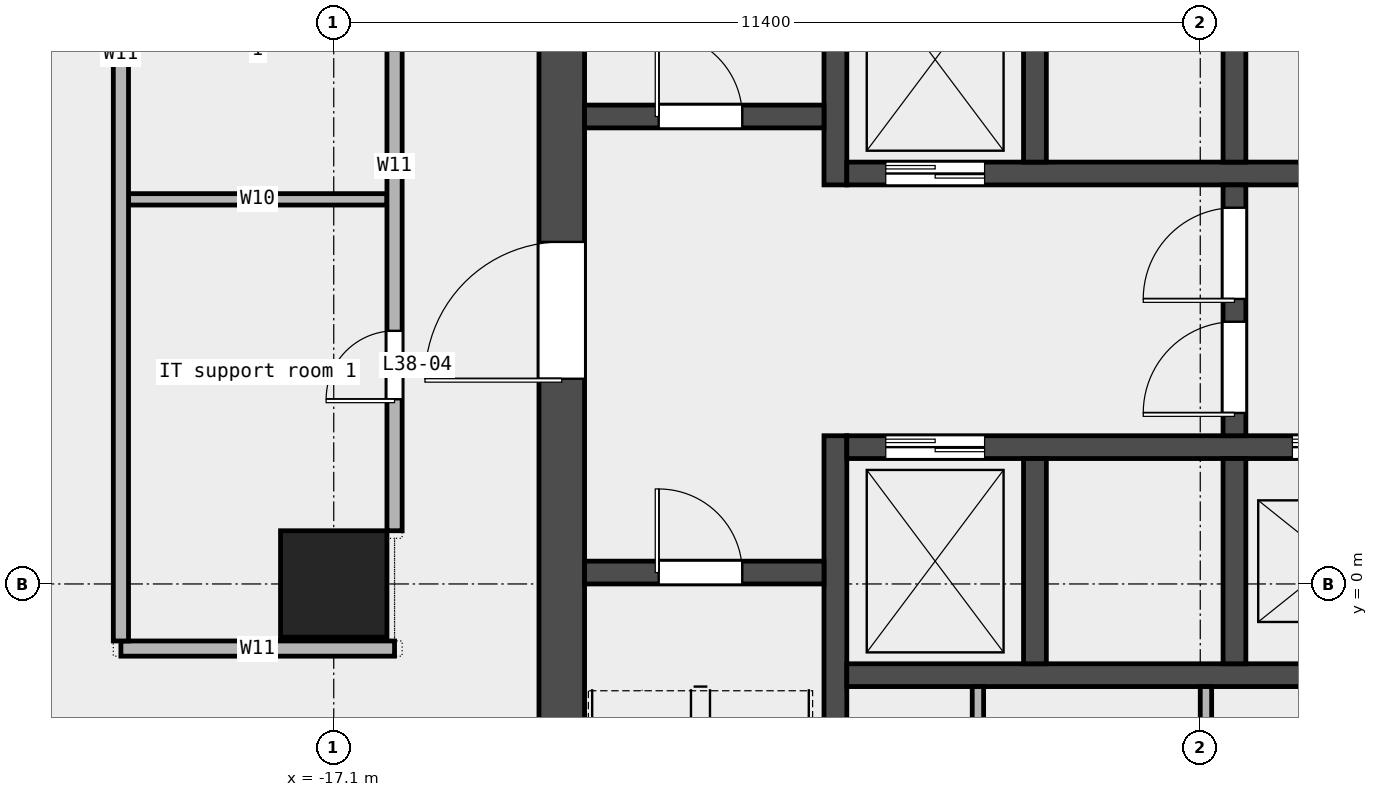
"""IFC4 building model, lengths in metres.
Left out: names, types, materials, properties, quantities, classifications, styles, units other than length and angle.
Written with IfcOpenShell. Run it as: python <this file> out.ifc"""

import sys

from ifc_helpers import new_model, si_unit, direction, frame, frame_2d, origin, origin_2d, place, context, subcontext, project, spatial, rectangle, extrude, element, fill, save


model = new_model("IFC4")
c1 = context("Model", 3, precision=1e-05, world=origin(), true_north=direction((0.0, 1.0)))
c2 = subcontext(c1, "Body", "Model", "MODEL_VIEW")
j1 = project(units=[si_unit("LENGTHUNIT", "METRE"), si_unit("PLANEANGLEUNIT", "RADIAN")], contexts=[c1])
p1 = place(None, origin())
s1 = spatial("IfcSite", under=j1, at=p1, CompositionType="ELEMENT")
p2 = place(p1, origin())
s2 = spatial("IfcBuilding", under=s1, at=p2, CompositionType="ELEMENT")
p3 = place(p2, frame((0.0, 0.0, 185.0)))
s3 = spatial("IfcBuildingStorey", under=s2, at=p3, CompositionType="ELEMENT", Elevation=185.0)
p4 = place(p3, frame((-17.1, 0.0, 0.0), z_axis=(0.0, 0.0, 1.0), x_axis=(1.0, 0.0, 0.0)))
e1 = element("IfcColumn", 1, at=p4, inside=s3, PredefinedType="COLUMN", context=c2, shape_type="SweptSolid", body=[
    extrude(rectangle(XDim=1.4, YDim=1.4, at=origin_2d()), origin(), (0.0, 0.0, 1.0), 3.6),
])
p5 = place(p3, frame((-19.9, -0.85, 0.0), z_axis=(0.0, 0.0, 1.0), x_axis=(1.0, 0.0, 0.0)))
e2 = element("IfcWall", 2, at=p5, inside=s3, PredefinedType="PARTITIONING", context=c2, shape_type="SweptSolid", body=[
    extrude(rectangle(XDim=3.6, YDim=0.2, at=frame_2d((1.8, 0.0))), origin(), (0.0, 0.0, 1.0), 3.6),
])
p6 = place(p3, frame((-19.8, 5.06, 0.0), z_axis=(0.0, 0.0, 1.0), x_axis=(1.0, 0.0, 0.0)))
e3 = element("IfcWall", 3, at=p6, inside=s3, PredefinedType="PARTITIONING", context=c2, shape_type="SweptSolid", body=[
    extrude(rectangle(XDim=3.4, YDim=0.15, at=frame_2d((1.7, 0.0))), origin(), (0.0, 0.0, 1.0), 3.6),
])
p7 = place(p3, frame((-19.9, -0.75, 0.0), z_axis=(0.0, 0.0, 1.0), x_axis=(0.0, 1.0, 0.0)))
e4 = element("IfcWall", 4, at=p7, inside=s3, PredefinedType="PARTITIONING", context=c2, shape_type="SweptSolid", body=[
    extrude(rectangle(XDim=16.05, YDim=0.2, at=frame_2d((8.025, 0.0))), origin(), (0.0, 0.0, 1.0), 3.6),
])
p8 = place(p3, frame((-16.3, 0.7, 0.0), z_axis=(0.0, 0.0, 1.0), x_axis=(0.0, 1.0, 0.0)))
e5 = element("IfcWall", 5, at=p8, inside=s3, PredefinedType="PARTITIONING", context=c2, shape_type="SweptSolid", body=[
    extrude(rectangle(XDim=9.6, YDim=0.2, at=frame_2d((4.8, 0.0))), origin(), (0.0, 0.0, 1.0), 3.6),
])
p9 = place(p8, frame((1.73, 0.0, 0.0)))
e6 = element("IfcOpeningElement", 6, at=p9, cuts=e5, PredefinedType="OPENING", context=c2, shape_type="SweptSolid", body=[
    extrude(rectangle(XDim=0.9, YDim=2.1, at=frame_2d((0.45, 1.05))), frame((0.0, 0.112, 0.0), z_axis=(0.0, -1.0, 0.0), x_axis=(1.0, 0.0, 0.0)), (0.0, 0.0, 1.0), 0.224),
])
p10 = place(p8, frame((6.353, 0.0, 0.0)))
e7 = element("IfcOpeningElement", 7, at=p10, cuts=e5, PredefinedType="OPENING", context=c2, shape_type="SweptSolid", body=[
    extrude(rectangle(XDim=0.9, YDim=2.1, at=frame_2d((0.45, 1.05))), frame((0.0, 0.112, 0.0), z_axis=(0.0, -1.0, 0.0), x_axis=(1.0, 0.0, 0.0)), (0.0, 0.0, 1.0), 0.224),
])
p11 = place(p3, frame((-14.1, -6.6, 0.0), z_axis=(0.0, 0.0, 1.0), x_axis=(0.0, 1.0, 0.0)))
e8 = element("IfcWall", 8, at=p11, inside=s3, PredefinedType="SHEAR", context=c2, shape_type="SweptSolid", body=[
    extrude(rectangle(XDim=19.5, YDim=0.6, at=frame_2d((9.75, 0.0))), origin(), (0.0, 0.0, 1.0), 3.7),
])
p12 = place(p11, frame((9.3, 0.0, 0.0)))
e9 = element("IfcOpeningElement", 9, at=p12, cuts=e8, PredefinedType="OPENING", context=c2, shape_type="SweptSolid", body=[
    extrude(rectangle(XDim=1.8, YDim=2.1, at=frame_2d((0.9, 1.05))), frame((0.0, 0.312, 0.0), z_axis=(0.0, -1.0, 0.0), x_axis=(1.0, 0.0, 0.0)), (0.0, 0.0, 1.0), 0.624),
])
p13 = place(p3, frame((-10.5, -6.6, 0.0), z_axis=(0.0, 0.0, 1.0), x_axis=(0.0, 1.0, 0.0)))
e10 = element("IfcWall", 10, at=p13, inside=s3, PredefinedType="SHEAR", context=c2, shape_type="SweptSolid", body=[
    extrude(rectangle(XDim=8.55, YDim=0.3, at=frame_2d((4.275, 0.0))), origin(), (0.0, 0.0, 1.0), 3.7),
])
p14 = place(p3, frame((-10.5, 5.25, 0.0), z_axis=(0.0, 0.0, 1.0), x_axis=(0.0, 1.0, 0.0)))
e11 = element("IfcWall", 11, at=p14, inside=s3, PredefinedType="SHEAR", context=c2, shape_type="SweptSolid", body=[
    extrude(rectangle(XDim=7.65, YDim=0.3, at=frame_2d((3.825, 0.0))), origin(), (0.0, 0.0, 1.0), 3.7),
])
p15 = place(p3, frame((-13.8, 0.15, 0.0), z_axis=(0.0, 0.0, 1.0), x_axis=(1.0, 0.0, 0.0)))
e12 = element("IfcWall", 12, at=p15, inside=s3, PredefinedType="SOLIDWALL", context=c2, shape_type="SweptSolid", body=[
    extrude(rectangle(XDim=3.15, YDim=0.3, at=frame_2d((1.575, 0.0))), origin(), (0.0, 0.0, 1.0), 3.7),
])
p16 = place(p15, frame((0.975, 0.0, 0.0)))
e13 = element("IfcOpeningElement", 13, at=p16, cuts=e12, PredefinedType="OPENING", context=c2, shape_type="SweptSolid", body=[
    extrude(rectangle(XDim=1.1, YDim=2.1, at=frame_2d((0.55, 1.05))), frame((0.0, 0.162, 0.0), z_axis=(0.0, -1.0, 0.0), x_axis=(1.0, 0.0, 0.0)), (0.0, 0.0, 1.0), 0.324),
])
p17 = place(p3, frame((-13.8, 6.15, 0.0), z_axis=(0.0, 0.0, 1.0), x_axis=(1.0, 0.0, 0.0)))
e14 = element("IfcWall", 14, at=p17, inside=s3, PredefinedType="SOLIDWALL", context=c2, shape_type="SweptSolid", body=[
    extrude(rectangle(XDim=3.15, YDim=0.3, at=frame_2d((1.575, 0.0))), origin(), (0.0, 0.0, 1.0), 3.7),
])
p18 = place(p17, frame((0.975, 0.0, 0.0)))
e15 = element("IfcOpeningElement", 15, at=p18, cuts=e14, PredefinedType="OPENING", context=c2, shape_type="SweptSolid", body=[
    extrude(rectangle(XDim=1.1, YDim=2.1, at=frame_2d((0.55, 1.05))), frame((0.0, 0.162, 0.0), z_axis=(0.0, -1.0, 0.0), x_axis=(1.0, 0.0, 0.0)), (0.0, 0.0, 1.0), 0.324),
])
p19 = place(p3, frame((-10.35, -1.2, 0.0), z_axis=(0.0, 0.0, 1.0), x_axis=(1.0, 0.0, 0.0)))
e16 = element("IfcWall", 16, at=p19, inside=s3, PredefinedType="SOLIDWALL", context=c2, shape_type="SweptSolid", body=[
    extrude(rectangle(XDim=20.7, YDim=0.3, at=frame_2d((10.35, 0.0))), origin(), (0.0, 0.0, 1.0), 3.7),
])
p20 = place(p3, frame((-10.35, 1.8, 0.0), z_axis=(0.0, 0.0, 1.0), x_axis=(1.0, 0.0, 0.0)))
e17 = element("IfcWall", 17, at=p20, inside=s3, PredefinedType="SOLIDWALL", context=c2, shape_type="SweptSolid", body=[
    extrude(rectangle(XDim=20.7, YDim=0.3, at=frame_2d((10.35, 0.0))), origin(), (0.0, 0.0, 1.0), 3.7),
])
p21 = place(p20, frame((0.512, 0.0, 0.0)))
e18 = element("IfcOpeningElement", 18, at=p21, cuts=e17, PredefinedType="OPENING", context=c2, shape_type="SweptSolid", body=[
    extrude(rectangle(XDim=1.3, YDim=2.1, at=frame_2d((0.65, 1.05))), frame((0.0, 0.162, 0.0), z_axis=(0.0, -1.0, 0.0), x_axis=(1.0, 0.0, 0.0)), (0.0, 0.0, 1.0), 0.324),
])
p22 = place(p20, frame((5.863, 0.0, 0.0)))
e19 = element("IfcOpeningElement", 19, at=p22, cuts=e17, PredefinedType="OPENING", context=c2, shape_type="SweptSolid", body=[
    extrude(rectangle(XDim=1.1, YDim=2.1, at=frame_2d((0.55, 1.05))), frame((0.0, 0.162, 0.0), z_axis=(0.0, -1.0, 0.0), x_axis=(1.0, 0.0, 0.0)), (0.0, 0.0, 1.0), 0.324),
])
p23 = place(p20, frame((8.488, 0.0, 0.0)))
e20 = element("IfcOpeningElement", 20, at=p23, cuts=e17, PredefinedType="OPENING", context=c2, shape_type="SweptSolid", body=[
    extrude(rectangle(XDim=1.1, YDim=2.1, at=frame_2d((0.55, 1.05))), frame((0.0, 0.162, 0.0), z_axis=(0.0, -1.0, 0.0), x_axis=(1.0, 0.0, 0.0)), (0.0, 0.0, 1.0), 0.324),
])
p24 = place(p20, frame((11.113, 0.0, 0.0)))
e21 = element("IfcOpeningElement", 21, at=p24, cuts=e17, PredefinedType="OPENING", context=c2, shape_type="SweptSolid", body=[
    extrude(rectangle(XDim=1.1, YDim=2.1, at=frame_2d((0.55, 1.05))), frame((0.0, 0.162, 0.0), z_axis=(0.0, -1.0, 0.0), x_axis=(1.0, 0.0, 0.0)), (0.0, 0.0, 1.0), 0.324),
])
p25 = place(p20, frame((13.738, 0.0, 0.0)))
e22 = element("IfcOpeningElement", 22, at=p25, cuts=e17, PredefinedType="OPENING", context=c2, shape_type="SweptSolid", body=[
    extrude(rectangle(XDim=1.1, YDim=2.1, at=frame_2d((0.55, 1.05))), frame((0.0, 0.162, 0.0), z_axis=(0.0, -1.0, 0.0), x_axis=(1.0, 0.0, 0.0)), (0.0, 0.0, 1.0), 0.324),
])
p26 = place(p20, frame((16.363, 0.0, 0.0)))
e23 = element("IfcOpeningElement", 23, at=p26, cuts=e17, PredefinedType="OPENING", context=c2, shape_type="SweptSolid", body=[
    extrude(rectangle(XDim=1.1, YDim=2.1, at=frame_2d((0.55, 1.05))), frame((0.0, 0.162, 0.0), z_axis=(0.0, -1.0, 0.0), x_axis=(1.0, 0.0, 0.0)), (0.0, 0.0, 1.0), 0.324),
])
p27 = place(p20, frame((18.988, 0.0, 0.0)))
e24 = element("IfcOpeningElement", 24, at=p27, cuts=e17, PredefinedType="OPENING", context=c2, shape_type="SweptSolid", body=[
    extrude(rectangle(XDim=1.1, YDim=2.1, at=frame_2d((0.55, 1.05))), frame((0.0, 0.162, 0.0), z_axis=(0.0, -1.0, 0.0), x_axis=(1.0, 0.0, 0.0)), (0.0, 0.0, 1.0), 0.324),
])
p28 = place(p3, frame((-10.35, 5.4, 0.0), z_axis=(0.0, 0.0, 1.0), x_axis=(1.0, 0.0, 0.0)))
e25 = element("IfcWall", 25, at=p28, inside=s3, PredefinedType="SOLIDWALL", context=c2, shape_type="SweptSolid", body=[
    extrude(rectangle(XDim=20.7, YDim=0.3, at=frame_2d((10.35, 0.0))), origin(), (0.0, 0.0, 1.0), 3.7),
])
p29 = place(p28, frame((0.512, 0.0, 0.0)))
e26 = element("IfcOpeningElement", 26, at=p29, cuts=e25, PredefinedType="OPENING", context=c2, shape_type="SweptSolid", body=[
    extrude(rectangle(XDim=1.3, YDim=2.1, at=frame_2d((0.65, 1.05))), frame((0.0, 0.162, 0.0), z_axis=(0.0, -1.0, 0.0), x_axis=(1.0, 0.0, 0.0)), (0.0, 0.0, 1.0), 0.324),
])
for number, where, z_axis, x_axis in (
    (27, (-7.875, -1.05, 0.0), (0.0, 0.0, 1.0), (0.0, 1.0, 0.0)),
    (28, (-5.25, -1.05, 0.0), (0.0, 0.0, 1.0), (0.0, 1.0, 0.0)),
    (29, (-7.875, 5.55, 0.0), (0.0, 0.0, 1.0), (0.0, 1.0, 0.0)),
    (30, (-5.25, 5.55, 0.0), (0.0, 0.0, 1.0), (0.0, 1.0, 0.0)),
):
    element("IfcWall", number, at=place(p3, frame(where, z_axis=z_axis, x_axis=x_axis)), inside=s3, PredefinedType="SOLIDWALL", context=c2, shape_type="SweptSolid", body=[
        extrude(rectangle(XDim=2.7, YDim=0.3, at=frame_2d((1.35, 0.0))), origin(), (0.0, 0.0, 1.0), 3.7),
    ])
p30 = place(p3, frame((-5.25, 1.95, 0.0), z_axis=(0.0, 0.0, 1.0), x_axis=(0.0, 1.0, 0.0)))
e31 = element("IfcWall", 31, at=p30, inside=s3, PredefinedType="SOLIDWALL", context=c2, shape_type="SweptSolid", body=[
    extrude(rectangle(XDim=3.3, YDim=0.3, at=frame_2d((1.65, 0.0))), origin(), (0.0, 0.0, 1.0), 3.7),
])
p31 = place(p30, frame((0.3, 0.0, 0.0)))
e32 = element("IfcOpeningElement", 32, at=p31, cuts=e31, PredefinedType="OPENING", context=c2, shape_type="SweptSolid", body=[
    extrude(rectangle(XDim=1.2, YDim=2.1, at=frame_2d((0.6, 1.05))), frame((0.0, 0.162, 0.0), z_axis=(0.0, -1.0, 0.0), x_axis=(1.0, 0.0, 0.0)), (0.0, 0.0, 1.0), 0.324),
])
p32 = place(p30, frame((1.8, 0.0, 0.0)))
e33 = element("IfcOpeningElement", 33, at=p32, cuts=e31, PredefinedType="OPENING", context=c2, shape_type="SweptSolid", body=[
    extrude(rectangle(XDim=1.2, YDim=2.1, at=frame_2d((0.6, 1.05))), frame((0.0, 0.162, 0.0), z_axis=(0.0, -1.0, 0.0), x_axis=(1.0, 0.0, 0.0)), (0.0, 0.0, 1.0), 0.324),
])
p33 = place(p3, frame((-8.625, -6.6, 0.0), z_axis=(0.0, 0.0, 1.0), x_axis=(0.0, 1.0, 0.0)))
e34 = element("IfcWall", 34, at=p33, inside=s3, PredefinedType="PARTITIONING", context=c2, shape_type="SweptSolid", body=[
    extrude(rectangle(XDim=5.25, YDim=0.15, at=frame_2d((2.625, 0.0))), origin(), (0.0, 0.0, 1.0), 3.7),
])
p34 = place(p3, frame((-5.625, -4.425, 0.0), z_axis=(0.0, 0.0, 1.0), x_axis=(0.0, 1.0, 0.0)))
e35 = element("IfcWall", 35, at=p34, inside=s3, PredefinedType="PARTITIONING", context=c2, shape_type="SweptSolid", body=[
    extrude(rectangle(XDim=3.075, YDim=0.15, at=frame_2d((1.538, 0.0))), origin(), (0.0, 0.0, 1.0), 3.7),
])
p35 = place(p9, origin())
e36 = element("IfcDoor", 36, at=p35, inside=s3, OperationType="SINGLE_SWING_LEFT", PredefinedType="DOOR", context=c2, shape_type="SweptSolid", body=[
    extrude(rectangle(XDim=0.9, YDim=2.1, at=frame_2d((0.45, 1.05))), frame((0.0, 0.025, 0.0), z_axis=(0.0, -1.0, 0.0), x_axis=(1.0, 0.0, 0.0)), (0.0, 0.0, 1.0), 0.05),
])
fill(e6, e36)
p36 = place(p16, origin())
e37 = element("IfcDoor", 37, at=p36, inside=s3, OperationType="SINGLE_SWING_LEFT", PredefinedType="DOOR", context=c2, shape_type="SweptSolid", body=[
    extrude(rectangle(XDim=1.1, YDim=2.1, at=frame_2d((0.55, 1.05))), frame((0.0, 0.025, 0.0), z_axis=(0.0, -1.0, 0.0), x_axis=(1.0, 0.0, 0.0)), (0.0, 0.0, 1.0), 0.05),
])
fill(e13, e37)
p37 = place(p18, origin())
e38 = element("IfcDoor", 38, at=p37, inside=s3, OperationType="SINGLE_SWING_LEFT", PredefinedType="DOOR", context=c2, shape_type="SweptSolid", body=[
    extrude(rectangle(XDim=1.1, YDim=2.1, at=frame_2d((0.55, 1.05))), frame((0.0, 0.025, 0.0), z_axis=(0.0, -1.0, 0.0), x_axis=(1.0, 0.0, 0.0)), (0.0, 0.0, 1.0), 0.05),
])
fill(e15, e38)
p38 = place(p12, origin())
e39 = element("IfcDoor", 39, at=p38, inside=s3, OperationType="DOUBLE_DOOR_SINGLE_SWING", PredefinedType="DOOR", context=c2, shape_type="SweptSolid", body=[
    extrude(rectangle(XDim=1.8, YDim=2.1, at=frame_2d((0.9, 1.05))), frame((0.0, 0.025, 0.0), z_axis=(0.0, -1.0, 0.0), x_axis=(1.0, 0.0, 0.0)), (0.0, 0.0, 1.0), 0.05),
])
fill(e9, e39)
p39 = place(p31, origin())
e40 = element("IfcDoor", 40, at=p39, inside=s3, OperationType="SINGLE_SWING_LEFT", PredefinedType="DOOR", context=c2, shape_type="SweptSolid", body=[
    extrude(rectangle(XDim=1.2, YDim=2.1, at=frame_2d((0.6, 1.05))), frame((0.0, 0.025, 0.0), z_axis=(0.0, -1.0, 0.0), x_axis=(1.0, 0.0, 0.0)), (0.0, 0.0, 1.0), 0.05),
])
fill(e32, e40)
p40 = place(p32, origin())
e41 = element("IfcDoor", 41, at=p40, inside=s3, OperationType="SINGLE_SWING_RIGHT", PredefinedType="DOOR", context=c2, shape_type="SweptSolid", body=[
    extrude(rectangle(XDim=1.2, YDim=2.1, at=frame_2d((0.6, 1.05))), frame((0.0, 0.025, 0.0), z_axis=(0.0, -1.0, 0.0), x_axis=(1.0, 0.0, 0.0)), (0.0, 0.0, 1.0), 0.05),
])
fill(e33, e41)
p41 = place(p21, origin())
e42 = element("IfcDoor", 42, at=p41, inside=s3, OperationType="DOUBLE_DOOR_SLIDING", PredefinedType="DOOR", context=c2, shape_type="SweptSolid", body=[
    extrude(rectangle(XDim=1.3, YDim=2.1, at=frame_2d((0.65, 1.05))), frame((0.0, 0.025, 0.0), z_axis=(0.0, -1.0, 0.0), x_axis=(1.0, 0.0, 0.0)), (0.0, 0.0, 1.0), 0.05),
])
fill(e18, e42)
p42 = place(p22, origin())
e43 = element("IfcDoor", 43, at=p42, inside=s3, OperationType="DOUBLE_DOOR_SLIDING", PredefinedType="DOOR", context=c2, shape_type="SweptSolid", body=[
    extrude(rectangle(XDim=1.1, YDim=2.1, at=frame_2d((0.55, 1.05))), frame((0.0, 0.025, 0.0), z_axis=(0.0, -1.0, 0.0), x_axis=(1.0, 0.0, 0.0)), (0.0, 0.0, 1.0), 0.05),
])
fill(e19, e43)
p43 = place(p29, origin())
e44 = element("IfcDoor", 44, at=p43, inside=s3, OperationType="DOUBLE_DOOR_SLIDING", PredefinedType="DOOR", context=c2, shape_type="SweptSolid", body=[
    extrude(rectangle(XDim=1.3, YDim=2.1, at=frame_2d((0.65, 1.05))), frame((0.0, 0.025, 0.0), z_axis=(0.0, -1.0, 0.0), x_axis=(1.0, 0.0, 0.0)), (0.0, 0.0, 1.0), 0.05),
])
fill(e26, e44)
save(model, sys.argv[1])
